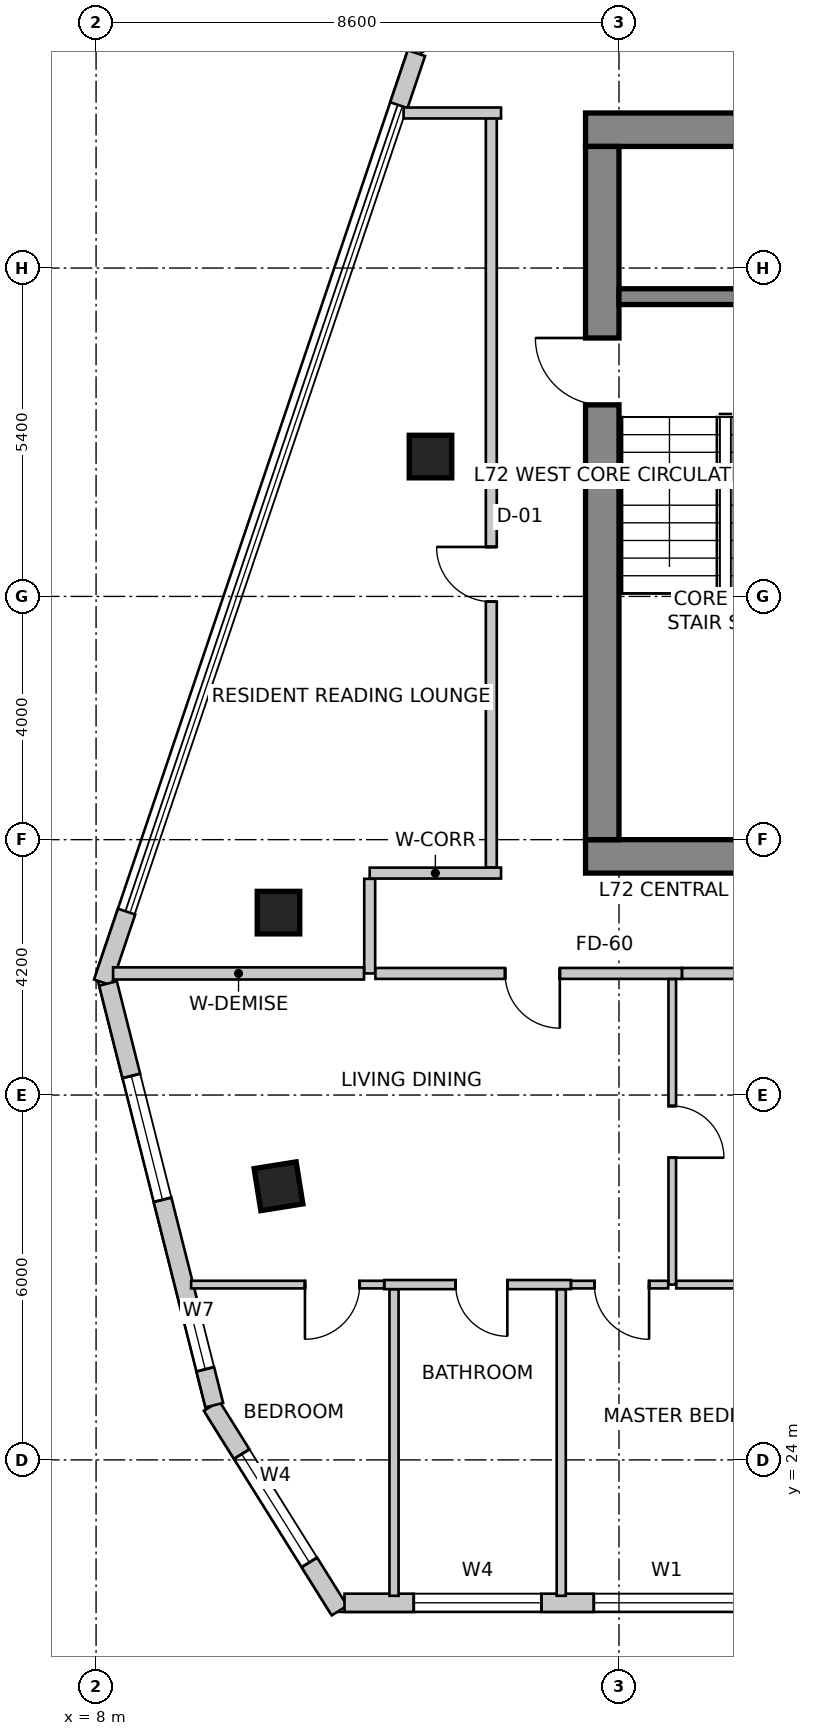
"""IFC4 building model, lengths in metres.
Left out: names, types, materials, properties, quantities, classifications, styles, units other than length and angle.
Written with IfcOpenShell. Run it as: python <this file> out.ifc"""

import sys

from ifc_helpers import new_model, si_unit, direction, frame, frame_2d, origin, origin_2d, place, context, subcontext, project, spatial, rectangle, extrude, source, transform, mapped, element, fill, save


model = new_model("IFC4")
c1 = context("Model", 3, precision=1e-05, world=origin(), true_north=direction((0.0, 1.0)))
c2 = subcontext(c1, "Body", "Model", "MODEL_VIEW")
j1 = project(units=[si_unit("LENGTHUNIT", "METRE"), si_unit("PLANEANGLEUNIT", "RADIAN")], contexts=[c1])
p1 = place(None, origin())
s1 = spatial("IfcSite", under=j1, at=p1, CompositionType="ELEMENT")
p2 = place(p1, origin())
s2 = spatial("IfcBuilding", under=s1, at=p2, CompositionType="ELEMENT")
p3 = place(p2, frame((0.0, 0.0, 281.7)))
s3 = spatial("IfcBuildingStorey", under=s2, at=p3, CompositionType="ELEMENT", Elevation=281.7)
p4 = place(p3, frame((16.05, 45.875, 0.0), z_axis=(0.0, 0.0, 1.0), x_axis=(1.0, 0.0, 0.0)))
e1 = element("IfcWall", 1, at=p4, inside=s3, PredefinedType="SHEAR", context=c2, shape_type="SweptSolid", body=[
    extrude(rectangle(XDim=15.5, YDim=0.55, at=frame_2d((7.75, 0.0))), origin(), (0.0, 0.0, 1.0), 3.6),
])
p5 = place(p3, frame((16.05, 33.925, 0.0), z_axis=(0.0, 0.0, 1.0), x_axis=(1.0, 0.0, 0.0)))
e2 = element("IfcWall", 2, at=p5, inside=s3, PredefinedType="SHEAR", context=c2, shape_type="SweptSolid", body=[
    extrude(rectangle(XDim=15.5, YDim=0.55, at=frame_2d((7.75, 0.0))), origin(), (0.0, 0.0, 1.0), 3.6),
])
m1 = source(origin(), c2, "Body", "SweptSolid", [
    extrude(rectangle(XDim=1.1, YDim=2.15, at=frame_2d((0.55, 1.075))), frame((0.0, 0.285, 0.0), z_axis=(0.0, -1.0, 0.0), x_axis=(1.0, 0.0, 0.0)), (0.0, 0.0, 1.0), 0.57),
])
p6 = place(p5, frame((9.98, 0.0, 0.0)))
e3 = element("IfcOpeningElement", 3, at=p6, cuts=e2, PredefinedType="OPENING", context=c2, shape_type="MappedRepresentation", body=[
    mapped(m1, transform((0.0, 0.0, 0.0), scale=1.0)),
])
p7 = place(p3, frame((16.325, 34.2, 0.0), z_axis=(0.0, 0.0, 1.0), x_axis=(0.0, 1.0, 0.0)))
e4 = element("IfcWall", 4, at=p7, inside=s3, PredefinedType="SHEAR", context=c2, shape_type="SweptSolid", body=[
    extrude(rectangle(XDim=11.4, YDim=0.55, at=frame_2d((5.7, 0.0))), origin(), (0.0, 0.0, 1.0), 3.6),
])
p8 = place(p7, frame((7.15, 0.0, 0.0)))
e5 = element("IfcOpeningElement", 5, at=p8, cuts=e4, PredefinedType="OPENING", context=c2, shape_type="MappedRepresentation", body=[
    mapped(m1, transform((0.0, 0.0, 0.0), scale=1.0)),
])
p9 = place(p3, frame((16.6, 43.13, 0.0), z_axis=(0.0, 0.0, 1.0), x_axis=(1.0, 0.0, 0.0)))
e6 = element("IfcWall", 6, at=p9, inside=s3, PredefinedType="SHEAR", context=c2, shape_type="SweptSolid", body=[
    extrude(rectangle(XDim=3.5, YDim=0.26, at=frame_2d((1.75, 0.0))), origin(), (0.0, 0.0, 1.0), 3.6),
])
m2 = source(origin(), c2, "Body", "SweptSolid", [
    extrude(rectangle(XDim=0.7, YDim=0.7, at=origin_2d()), origin(), (0.0, 0.0, 1.0), 3.6),
])
for number, where, z_axis, x_axis in (
    (7, (11.0, 33.0, 0.0), (0.0, 0.0, 1.0), (1.0, 0.0, 0.0)),
    (8, (13.5, 40.5, 0.0), (0.0, 0.0, 1.0), (1.0, 0.0, 0.0)),
    (9, (11.0, 28.5, 0.0), (0.0, 0.0, 1.0), (0.158, -0.987, 0.0)),
):
    element("IfcColumn", number, at=place(p3, frame(where, z_axis=z_axis, x_axis=x_axis)), inside=s3, PredefinedType="COLUMN", context=c2, shape_type="MappedRepresentation", body=[
        mapped(m2, transform((0.0, 0.0, 0.0), scale=1.0)),
    ])
p10 = place(p3, frame((9.9, 24.887, 0.0), z_axis=(0.0, 0.0, 1.0), x_axis=(0.530004471907, -0.84799484654, 0.0)))
e10 = element("IfcWall", 10, at=p10, inside=s3, PredefinedType="SOLIDWALL", context=c2, shape_type="SweptSolid", body=[
    extrude(rectangle(XDim=3.967, YDim=0.3, at=frame_2d((1.983, 0.0))), origin(), (0.0, 0.0, 1.0), 3.35),
])
m3 = source(origin(), c2, "Body", "SweptSolid", [
    extrude(rectangle(XDim=2.1, YDim=2.0, at=frame_2d((1.05, 1.0))), frame((0.0, 0.16, 0.0), z_axis=(0.0, -1.0, 0.0), x_axis=(1.0, 0.0, 0.0)), (0.0, 0.0, 1.0), 0.32),
])
p11 = place(p10, frame((0.933, 0.0, 0.85)))
e11 = element("IfcOpeningElement", 11, at=p11, cuts=e10, PredefinedType="OPENING", context=c2, shape_type="MappedRepresentation", body=[
    mapped(m3, transform((0.0, 0.0, 0.0), scale=1.0)),
])
p12 = place(p3, frame((12.086, 21.65, 0.0), z_axis=(0.0, 0.0, 1.0), x_axis=(1.0, 0.0, 0.0)))
e12 = element("IfcWall", 12, at=p12, inside=s3, PredefinedType="SOLIDWALL", context=c2, shape_type="SweptSolid", body=[
    extrude(rectangle(XDim=10.642, YDim=0.3, at=frame_2d((5.321, 0.0))), origin(), (0.0, 0.0, 1.0), 3.35),
])
p13 = place(p12, frame((1.139, 0.0, 0.85)))
e13 = element("IfcOpeningElement", 13, at=p13, cuts=e12, PredefinedType="OPENING", context=c2, shape_type="MappedRepresentation", body=[
    mapped(m3, transform((0.0, 0.0, 0.0), scale=1.0)),
])
m4 = source(origin(), c2, "Body", "SweptSolid", [
    extrude(rectangle(XDim=2.4, YDim=2.2, at=frame_2d((1.2, 1.1))), frame((0.0, 0.16, 0.0), z_axis=(0.0, -1.0, 0.0), x_axis=(1.0, 0.0, 0.0)), (0.0, 0.0, 1.0), 0.32),
])
p14 = place(p12, frame((4.1, 0.0, 0.85)))
e14 = element("IfcOpeningElement", 14, at=p14, cuts=e12, PredefinedType="OPENING", context=c2, shape_type="MappedRepresentation", body=[
    mapped(m4, transform((0.0, 0.0, 0.0), scale=1.0)),
])
p15 = place(p12, frame((7.572, 0.0, 0.85)))
e15 = element("IfcOpeningElement", 15, at=p15, cuts=e12, PredefinedType="OPENING", context=c2, shape_type="MappedRepresentation", body=[
    mapped(m4, transform((0.0, 0.0, 0.0), scale=1.0)),
])
p16 = place(p3, frame((21.873, 52.741, 0.0), z_axis=(0.0, 0.0, 1.0), x_axis=(-0.843661487732, -0.536875492193, 0.0)))
e16 = element("IfcWall", 16, at=p16, inside=s3, PredefinedType="SOLIDWALL", context=c2, shape_type="SweptSolid", body=[
    extrude(rectangle(XDim=10.282, YDim=0.3, at=frame_2d((5.141, 0.0))), origin(), (0.0, 0.0, 1.0), 3.35),
])
p17 = place(p16, frame((1.41, 0.0, 0.85)))
e17 = element("IfcOpeningElement", 17, at=p17, cuts=e16, PredefinedType="OPENING", context=c2, shape_type="MappedRepresentation", body=[
    mapped(m3, transform((0.0, 0.0, 0.0), scale=1.0)),
])
p18 = place(p16, frame((5.539, 0.0, 0.85)))
e18 = element("IfcOpeningElement", 18, at=p18, cuts=e16, PredefinedType="OPENING", context=c2, shape_type="MappedRepresentation", body=[
    mapped(m4, transform((0.0, 0.0, 0.0), scale=1.0)),
])
p19 = place(p3, frame((13.269, 47.134, 0.0), z_axis=(0.0, 0.0, 1.0), x_axis=(-0.31995770778, -0.947431826166, 0.0)))
e19 = element("IfcWall", 19, at=p19, inside=s3, PredefinedType="SOLIDWALL", context=c2, shape_type="SweptSolid", body=[
    extrude(rectangle(XDim=0.903, YDim=0.3, at=frame_2d((0.451, 0.0))), origin(), (0.0, 0.0, 1.0), 3.35),
])
p20 = place(p3, frame((8.502, 33.017, 0.0), z_axis=(0.0, 0.0, 1.0), x_axis=(-0.319798692732, -0.947485512357, 0.0)))
e20 = element("IfcWall", 20, at=p20, inside=s3, PredefinedType="SOLIDWALL", context=c2, shape_type="SweptSolid", body=[
    extrude(rectangle(XDim=1.23, YDim=0.3, at=frame_2d((0.615, 0.0))), origin(), (0.0, 0.0, 1.0), 3.35),
])
p21 = place(p3, frame((8.196, 31.835, 0.0), z_axis=(0.0, 0.0, 1.0), x_axis=(0.244430846523, -0.969666726906, 0.0)))
e21 = element("IfcWall", 21, at=p21, inside=s3, PredefinedType="SOLIDWALL", context=c2, shape_type="SweptSolid", body=[
    extrude(rectangle(XDim=7.152, YDim=0.3, at=frame_2d((3.576, 0.0))), origin(), (0.0, 0.0, 1.0), 3.35),
])
p22 = place(p21, frame((1.568, 0.0, 0.85)))
e22 = element("IfcOpeningElement", 22, at=p22, cuts=e21, PredefinedType="OPENING", context=c2, shape_type="MappedRepresentation", body=[
    mapped(m3, transform((0.0, 0.0, 0.0), scale=1.0)),
])
m5 = source(origin(), c2, "Body", "SweptSolid", [
    extrude(rectangle(XDim=0.9, YDim=1.6, at=frame_2d((0.45, 0.8))), frame((0.0, 0.16, 0.0), z_axis=(0.0, -1.0, 0.0), x_axis=(1.0, 0.0, 0.0)), (0.0, 0.0, 1.0), 0.32),
])
p23 = place(p21, frame((5.643, 0.0, 0.85)))
e23 = element("IfcOpeningElement", 23, at=p23, cuts=e21, PredefinedType="OPENING", context=c2, shape_type="MappedRepresentation", body=[
    mapped(m5, transform((0.0, 0.0, 0.0), scale=1.0)),
])
p24 = place(p3, frame((12.5, 33.65, 0.0), z_axis=(0.0, 0.0, 1.0), x_axis=(1.0, 0.0, 0.0)))
e24 = element("IfcWall", 24, at=p24, inside=s3, PredefinedType="PARTITIONING", context=c2, shape_type="SweptSolid", body=[
    extrude(rectangle(XDim=2.16, YDim=0.18, at=frame_2d((1.08, 0.0))), origin(), (0.0, 0.0, 1.0), 3.35),
])
p25 = place(p3, frame((12.5, 32.0, 0.0), z_axis=(0.0, 0.0, 1.0), x_axis=(0.0, 1.0, 0.0)))
e25 = element("IfcWall", 25, at=p25, inside=s3, PredefinedType="PARTITIONING", context=c2, shape_type="SweptSolid", body=[
    extrude(rectangle(XDim=1.556, YDim=0.18, at=frame_2d((0.778, 0.0))), origin(), (0.0, 0.0, 1.0), 2.935),
])
p26 = place(p3, frame((17.636, 32.0, 0.0), z_axis=(0.0, 0.0, 1.0), x_axis=(-1.0, 0.0, 0.0)))
e26 = element("IfcWall", 26, at=p26, inside=s3, PredefinedType="PARTITIONING", context=c2, shape_type="SweptSolid", body=[
    extrude(rectangle(XDim=5.042, YDim=0.18, at=frame_2d((2.521, 0.0))), origin(), (0.0, 0.0, 1.0), 2.935),
])
m6 = source(origin(), c2, "Body", "SweptSolid", [
    extrude(rectangle(XDim=0.9, YDim=2.15, at=frame_2d((0.45, 1.075))), frame((0.0, 0.1, 0.0), z_axis=(0.0, -1.0, 0.0), x_axis=(1.0, 0.0, 0.0)), (0.0, 0.0, 1.0), 0.2),
])
p27 = place(p26, frame((2.009, 0.0, 0.0)))
e27 = element("IfcOpeningElement", 27, at=p27, cuts=e26, PredefinedType="OPENING", context=c2, shape_type="MappedRepresentation", body=[
    mapped(m6, transform((0.0, 0.0, 0.0), scale=1.0)),
])
p28 = place(p3, frame((20.832, 32.0, 0.0), z_axis=(0.0, 0.0, 1.0), x_axis=(-1.0, 0.0, 0.0)))
e28 = element("IfcWall", 28, at=p28, inside=s3, PredefinedType="PARTITIONING", context=c2, shape_type="SweptSolid", body=[
    extrude(rectangle(XDim=3.194, YDim=0.18, at=frame_2d((1.597, 0.0))), origin(), (0.0, 0.0, 1.0), 3.35),
])
p29 = place(p3, frame((14.5, 33.744, 0.0), z_axis=(0.0, 0.0, 1.0), x_axis=(0.0, 1.0, 0.0)))
e29 = element("IfcWall", 29, at=p29, inside=s3, PredefinedType="PARTITIONING", context=c2, shape_type="SweptSolid", body=[
    extrude(rectangle(XDim=12.406, YDim=0.18, at=frame_2d((6.203, 0.0))), origin(), (0.0, 0.0, 1.0), 3.35),
])
p30 = place(p29, frame((4.37, 0.0, 0.0)))
e30 = element("IfcOpeningElement", 30, at=p30, cuts=e29, PredefinedType="OPENING", context=c2, shape_type="MappedRepresentation", body=[
    mapped(m6, transform((0.0, 0.0, 0.0), scale=1.0)),
])
p31 = place(p3, frame((14.66, 46.15, 0.0), z_axis=(0.0, 0.0, 1.0), x_axis=(-1.0, 0.0, 0.0)))
e31 = element("IfcWall", 31, at=p31, inside=s3, PredefinedType="PARTITIONING", context=c2, shape_type="SweptSolid", body=[
    extrude(rectangle(XDim=1.602, YDim=0.18, at=frame_2d((0.801, 0.0))), origin(), (0.0, 0.0, 1.0), 3.35),
])
p32 = place(p3, frame((12.406, 32.0, 0.0), z_axis=(0.0, 0.0, 1.0), x_axis=(-1.0, 0.0, 0.0)))
e32 = element("IfcWall", 32, at=p32, inside=s3, PredefinedType="PARTITIONING", context=c2, shape_type="SweptSolid", body=[
    extrude(rectangle(XDim=4.126, YDim=0.2, at=frame_2d((2.063, 0.0))), origin(), (0.0, 0.0, 1.0), 2.642),
])
p33 = place(p3, frame((17.476, 31.906, 0.0), z_axis=(0.0, 0.0, 1.0), x_axis=(0.0, -1.0, 0.0)))
e33 = element("IfcWall", 33, at=p33, inside=s3, PredefinedType="PARTITIONING", context=c2, shape_type="SweptSolid", body=[
    extrude(rectangle(XDim=5.023, YDim=0.125, at=frame_2d((2.511, 0.0))), origin(), (0.0, 0.0, 1.0), 2.935),
])
m7 = source(origin(), c2, "Body", "SweptSolid", [
    extrude(rectangle(XDim=0.85, YDim=2.15, at=frame_2d((0.425, 1.075))), frame((0.0, 0.073, 0.0), z_axis=(0.0, -1.0, 0.0), x_axis=(1.0, 0.0, 0.0)), (0.0, 0.0, 1.0), 0.145),
])
p34 = place(p33, frame((2.086, 0.0, 0.0)))
e34 = element("IfcOpeningElement", 34, at=p34, cuts=e33, PredefinedType="OPENING", context=c2, shape_type="MappedRepresentation", body=[
    mapped(m7, transform((0.0, 0.0, 0.0), scale=1.0)),
])
p35 = place(p3, frame((15.81, 26.883, 0.0), z_axis=(0.0, 0.0, 1.0), x_axis=(-1.0, 0.0, 0.0)))
e35 = element("IfcWall", 35, at=p35, inside=s3, PredefinedType="PARTITIONING", context=c2, shape_type="SweptSolid", body=[
    extrude(rectangle(XDim=3.07, YDim=0.15, at=frame_2d((1.535, 0.0))), origin(), (0.0, 0.0, 1.0), 2.935),
])
m8 = source(origin(), c2, "Body", "SweptSolid", [
    extrude(rectangle(XDim=0.85, YDim=2.15, at=frame_2d((0.425, 1.075))), frame((0.0, 0.085, 0.0), z_axis=(0.0, -1.0, 0.0), x_axis=(1.0, 0.0, 0.0)), (0.0, 0.0, 1.0), 0.17),
])
p36 = place(p35, frame((1.046, 0.0, 0.0)))
e36 = element("IfcOpeningElement", 36, at=p36, cuts=e35, PredefinedType="OPENING", context=c2, shape_type="MappedRepresentation", body=[
    mapped(m8, transform((0.0, 0.0, 0.0), scale=1.0)),
])
p37 = place(p3, frame((12.738, 26.883, 0.0), z_axis=(0.0, 0.0, 1.0), x_axis=(-1.0, 0.0, 0.0)))
e37 = element("IfcWall", 37, at=p37, inside=s3, PredefinedType="PARTITIONING", context=c2, shape_type="SweptSolid", body=[
    extrude(rectangle(XDim=3.175, YDim=0.125, at=frame_2d((1.587, 0.0))), origin(), (0.0, 0.0, 1.0), 3.35),
])
m9 = source(origin(), c2, "Body", "SweptSolid", [
    extrude(rectangle(XDim=0.9, YDim=2.15, at=frame_2d((0.45, 1.075))), frame((0.0, 0.073, 0.0), z_axis=(0.0, -1.0, 0.0), x_axis=(1.0, 0.0, 0.0)), (0.0, 0.0, 1.0), 0.145),
])
p38 = place(p37, frame((0.403, 0.0, 0.0)))
e38 = element("IfcOpeningElement", 38, at=p38, cuts=e37, PredefinedType="OPENING", context=c2, shape_type="MappedRepresentation", body=[
    mapped(m9, transform((0.0, 0.0, 0.0), scale=1.0)),
])
p39 = place(p3, frame((17.409, 26.883, 0.0), z_axis=(0.0, 0.0, 1.0), x_axis=(-1.0, 0.0, 0.0)))
e39 = element("IfcWall", 39, at=p39, inside=s3, PredefinedType="PARTITIONING", context=c2, shape_type="SweptSolid", body=[
    extrude(rectangle(XDim=1.597, YDim=0.125, at=frame_2d((0.799, 0.0))), origin(), (0.0, 0.0, 1.0), 2.935),
])
p40 = place(p39, frame((0.314, 0.0, 0.0)))
e40 = element("IfcOpeningElement", 40, at=p40, cuts=e39, PredefinedType="OPENING", context=c2, shape_type="MappedRepresentation", body=[
    mapped(m9, transform((0.0, 0.0, 0.0), scale=1.0)),
])
p41 = place(p3, frame((19.282, 26.883, 0.0), z_axis=(0.0, 0.0, 1.0), x_axis=(-1.0, 0.0, 0.0)))
e41 = element("IfcWall", 41, at=p41, inside=s3, PredefinedType="PARTITIONING", context=c2, shape_type="SweptSolid", body=[
    extrude(rectangle(XDim=1.74, YDim=0.125, at=frame_2d((0.87, 0.0))), origin(), (0.0, 0.0, 1.0), 3.35),
])
for number, where, z_axis, x_axis in (
    (42, (12.9, 21.765, 0.0), (0.0, 0.0, 1.0), (0.0, 1.0, 0.0)),
    (43, (15.65, 26.804, 0.0), (0.0, 0.0, 1.0), (0.0, -1.0, 0.0)),
):
    element("IfcWall", number, at=place(p3, frame(where, z_axis=z_axis, x_axis=x_axis)), inside=s3, PredefinedType="PARTITIONING", context=c2, shape_type="SweptSolid", body=[
        extrude(rectangle(XDim=5.039, YDim=0.15, at=frame_2d((2.52, 0.0))), origin(), (0.0, 0.0, 1.0), 3.35),
    ])
m10 = source(origin(), c2, "Body", "SweptSolid", [
    extrude(rectangle(XDim=2.1, YDim=2.0, at=frame_2d((1.05, 1.0))), frame((0.0, -0.015, 0.0), z_axis=(0.0, -1.0, 0.0), x_axis=(1.0, 0.0, 0.0)), (0.0, 0.0, 1.0), 0.06),
])
p42 = place(p11, origin())
e44 = element("IfcWindow", 44, at=p42, inside=s3, PartitioningType="SINGLE_PANEL", PredefinedType="WINDOW", context=c2, shape_type="MappedRepresentation", body=[
    mapped(m10, transform((0.0, 0.0, 0.0), scale=1.0)),
])
fill(e11, e44)
p43 = place(p13, origin())
e45 = element("IfcWindow", 45, at=p43, inside=s3, PartitioningType="SINGLE_PANEL", PredefinedType="WINDOW", context=c2, shape_type="MappedRepresentation", body=[
    mapped(m10, transform((0.0, 0.0, 0.0), scale=1.0)),
])
fill(e13, e45)
m11 = source(origin(), c2, "Body", "SweptSolid", [
    extrude(rectangle(XDim=2.4, YDim=2.2, at=frame_2d((1.2, 1.1))), frame((0.0, -0.015, 0.0), z_axis=(0.0, -1.0, 0.0), x_axis=(1.0, 0.0, 0.0)), (0.0, 0.0, 1.0), 0.06),
])
p44 = place(p14, origin())
e46 = element("IfcWindow", 46, at=p44, inside=s3, PartitioningType="SINGLE_PANEL", PredefinedType="WINDOW", context=c2, shape_type="MappedRepresentation", body=[
    mapped(m11, transform((0.0, 0.0, 0.0), scale=1.0)),
])
fill(e14, e46)
p45 = place(p22, origin())
e47 = element("IfcWindow", 47, at=p45, inside=s3, PartitioningType="SINGLE_PANEL", PredefinedType="WINDOW", context=c2, shape_type="MappedRepresentation", body=[
    mapped(m10, transform((0.0, 0.0, 0.0), scale=1.0)),
])
fill(e22, e47)
m12 = source(origin(), c2, "Body", "SweptSolid", [
    extrude(rectangle(XDim=0.9, YDim=1.6, at=frame_2d((0.45, 0.8))), frame((0.0, -0.015, 0.0), z_axis=(0.0, -1.0, 0.0), x_axis=(1.0, 0.0, 0.0)), (0.0, 0.0, 1.0), 0.06),
])
p46 = place(p23, origin())
e48 = element("IfcWindow", 48, at=p46, inside=s3, PartitioningType="SINGLE_PANEL", PredefinedType="WINDOW", context=c2, shape_type="MappedRepresentation", body=[
    mapped(m12, transform((0.0, 0.0, 0.0), scale=1.0)),
])
fill(e23, e48)
m13 = source(origin(), c2, "Body", "SweptSolid", [
    extrude(rectangle(XDim=1.1, YDim=2.15, at=frame_2d((0.55, 1.075))), frame((0.0, 0.025, 0.0), z_axis=(0.0, -1.0, 0.0), x_axis=(1.0, 0.0, 0.0)), (0.0, 0.0, 1.0), 0.05),
])
p47 = place(p8, origin())
e49 = element("IfcDoor", 49, at=p47, inside=s3, OperationType="SINGLE_SWING_RIGHT", PredefinedType="DOOR", context=c2, shape_type="MappedRepresentation", body=[
    mapped(m13, transform((0.0, 0.0, 0.0), scale=1.0)),
])
fill(e5, e49)
m14 = source(origin(), c2, "Body", "SweptSolid", [
    extrude(rectangle(XDim=0.9, YDim=2.15, at=frame_2d((0.45, 1.075))), frame((0.0, 0.025, 0.0), z_axis=(0.0, -1.0, 0.0), x_axis=(1.0, 0.0, 0.0)), (0.0, 0.0, 1.0), 0.05),
])
p48 = place(p30, origin())
e50 = element("IfcDoor", 50, at=p48, inside=s3, OperationType="SINGLE_SWING_RIGHT", PredefinedType="DOOR", context=c2, shape_type="MappedRepresentation", body=[
    mapped(m14, transform((0.0, 0.0, 0.0), scale=1.0)),
])
fill(e30, e50)
m15 = source(origin(), c2, "Body", "SweptSolid", [
    extrude(rectangle(XDim=0.9, YDim=2.15, at=frame_2d((0.45, 1.075))), frame((0.0, 0.025, 0.0), z_axis=(0.0, -1.0, 0.0), x_axis=(1.0, 0.0, 0.0)), (0.0, 0.0, 1.0), 0.05),
])
p49 = place(p27, origin())
e51 = element("IfcDoor", 51, at=p49, inside=s3, OperationType="SINGLE_SWING_LEFT", PredefinedType="DOOR", context=c2, shape_type="MappedRepresentation", body=[
    mapped(m15, transform((0.0, 0.0, 0.0), scale=1.0)),
])
fill(e27, e51)
m16 = source(origin(), c2, "Body", "SweptSolid", [
    extrude(rectangle(XDim=0.85, YDim=2.15, at=frame_2d((0.425, 1.075))), frame((0.0, 0.025, 0.0), z_axis=(0.0, -1.0, 0.0), x_axis=(1.0, 0.0, 0.0)), (0.0, 0.0, 1.0), 0.05),
])
p50 = place(p34, origin())
e52 = element("IfcDoor", 52, at=p50, inside=s3, OperationType="SINGLE_SWING_RIGHT", PredefinedType="DOOR", context=c2, shape_type="MappedRepresentation", body=[
    mapped(m16, transform((0.0, 0.0, 0.0), scale=1.0)),
])
fill(e34, e52)
p51 = place(p36, origin())
e53 = element("IfcDoor", 53, at=p51, inside=s3, OperationType="SINGLE_SWING_LEFT", PredefinedType="DOOR", context=c2, shape_type="MappedRepresentation", body=[
    mapped(m16, transform((0.0, 0.0, 0.0), scale=1.0)),
])
fill(e36, e53)
p52 = place(p38, origin())
e54 = element("IfcDoor", 54, at=p52, inside=s3, OperationType="SINGLE_SWING_RIGHT", PredefinedType="DOOR", context=c2, shape_type="MappedRepresentation", body=[
    mapped(m14, transform((0.0, 0.0, 0.0), scale=1.0)),
])
fill(e38, e54)
p53 = place(p40, origin())
e55 = element("IfcDoor", 55, at=p53, inside=s3, OperationType="SINGLE_SWING_LEFT", PredefinedType="DOOR", context=c2, shape_type="MappedRepresentation", body=[
    mapped(m14, transform((0.0, 0.0, 0.0), scale=1.0)),
])
fill(e40, e55)
save(model, sys.argv[1])
